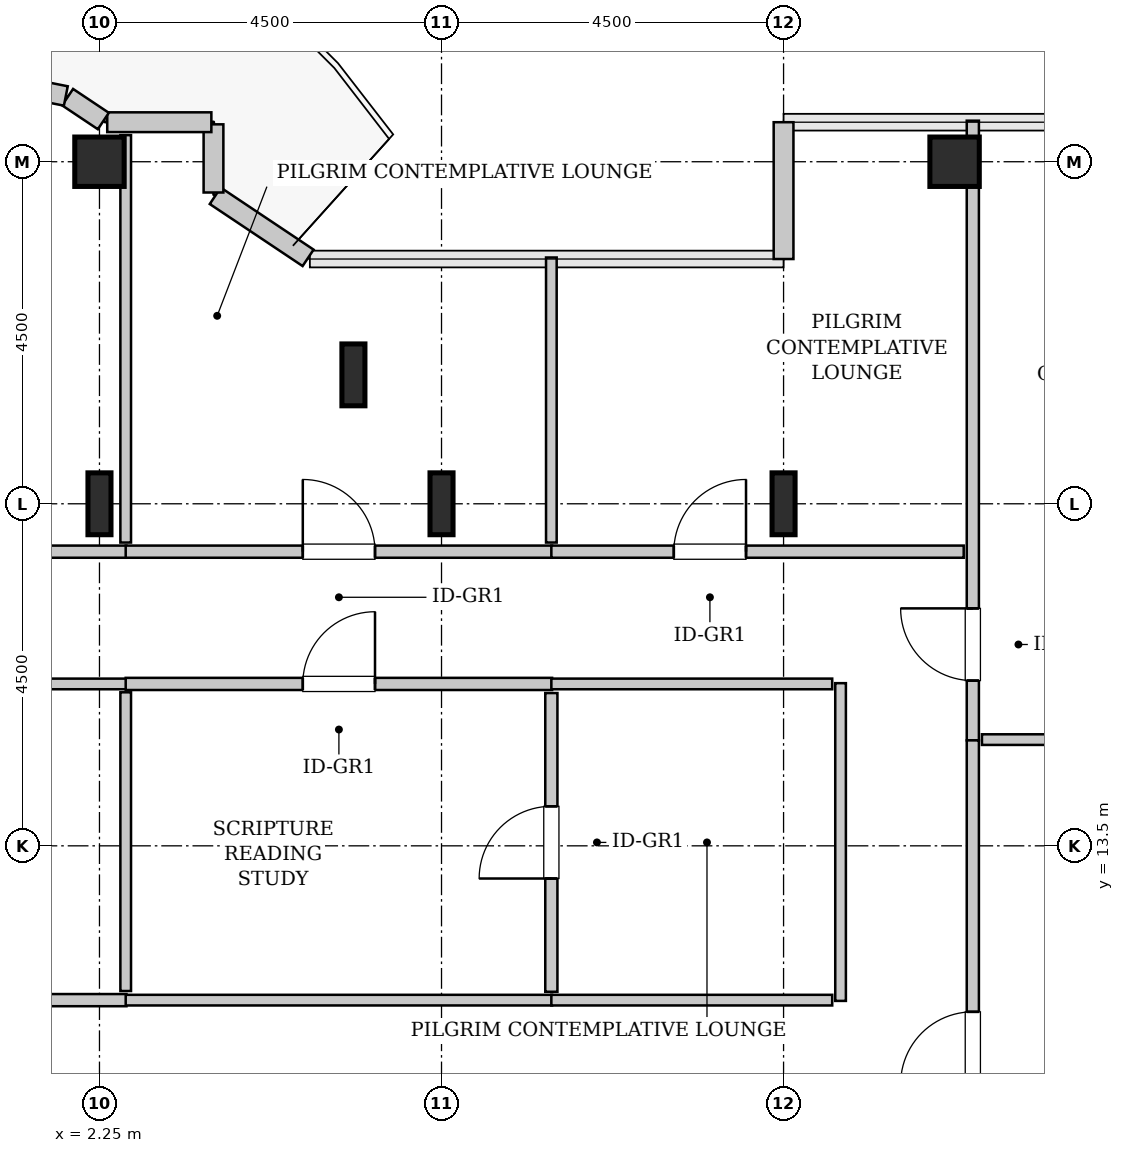
"""IFC4 building model, lengths in metres.
Left out: names, types, materials, properties, quantities, classifications, styles, units other than length and angle.
Written with IfcOpenShell. Run it as: python <this file> out.ifc"""

import sys

from ifc_helpers import new_model, si_unit, direction, frame, frame_2d, origin, origin_2d, place, context, subcontext, project, spatial, rectangle, hollow_rectangle, i_section, extrude, source, transform, mapped, element, fill, save


model = new_model("IFC4")
c1 = context("Model", 3, precision=1e-05, world=origin(), true_north=direction((0.0, 1.0)))
c2 = subcontext(c1, "Body", "Model", "MODEL_VIEW")
j1 = project(units=[si_unit("LENGTHUNIT", "METRE"), si_unit("PLANEANGLEUNIT", "RADIAN")], contexts=[c1])
p1 = place(None, origin())
s1 = spatial("IfcSite", under=j1, at=p1, CompositionType="ELEMENT")
p2 = place(p1, origin())
s2 = spatial("IfcBuilding", under=s1, at=p2, CompositionType="ELEMENT")
p3 = place(p2, frame((0.0, 0.0, 210.4)))
s3 = spatial("IfcBuildingStorey", under=s2, at=p3, CompositionType="ELEMENT", Elevation=210.4)
m1 = source(origin(), c2, "Body", "SweptSolid", [
    extrude(i_section(OverallWidth=0.303, OverallDepth=0.814, WebThickness=0.021, FlangeThickness=0.04, FilletRadius=0.03, at=origin_2d()), origin(), (0.0, 0.0, 1.0), 3.8),
])
p4 = place(p3, frame((2.25, 18.0, 0.0), z_axis=(0.0, 0.0, 1.0), x_axis=(1.0, 0.0, 0.0)))
e1 = element("IfcColumn", 1, at=p4, inside=s3, PredefinedType="COLUMN", context=c2, shape_type="MappedRepresentation", body=[
    mapped(m1, transform((0.0, 0.0, 0.0), x_axis=(1.0, 0.0, 0.0), y_axis=(0.0, 1.0, 0.0), z_axis=(0.0, 0.0, 1.0), scale=1.0)),
])
m2 = source(origin(), c2, "Body", "SweptSolid", [
    extrude(hollow_rectangle(XDim=0.65, YDim=0.65, WallThickness=0.032, InnerFilletRadius=0.032, OuterFilletRadius=0.064, at=origin_2d()), origin(), (0.0, 0.0, 1.0), 3.8),
])
p5 = place(p3, frame((2.25, 22.5, 0.0), z_axis=(0.0, 0.0, 1.0), x_axis=(1.0, 0.0, 0.0)))
e2 = element("IfcColumn", 2, at=p5, inside=s3, PredefinedType="COLUMN", context=c2, shape_type="MappedRepresentation", body=[
    mapped(m2, transform((0.0, 0.0, 0.0), x_axis=(1.0, 0.0, 0.0), y_axis=(0.0, 1.0, 0.0), z_axis=(0.0, 0.0, 1.0), scale=1.0)),
])
for number, where, z_axis, x_axis in (
    (3, (5.591, 19.696, 0.0), (0.0, 0.0, 1.0), (1.0, 0.0, 0.0)),
    (4, (6.75, 18.0, 0.0), (0.0, 0.0, 1.0), (1.0, 0.0, 0.0)),
    (5, (11.25, 18.0, 0.0), (0.0, 0.0, 1.0), (1.0, 0.0, 0.0)),
):
    element("IfcColumn", number, at=place(p3, frame(where, z_axis=z_axis, x_axis=x_axis)), inside=s3, PredefinedType="COLUMN", context=c2, shape_type="MappedRepresentation", body=[
        mapped(m1, transform((0.0, 0.0, 0.0), x_axis=(1.0, 0.0, 0.0), y_axis=(0.0, 1.0, 0.0), z_axis=(0.0, 0.0, 1.0), scale=1.0)),
    ])
p6 = place(p3, frame((13.5, 22.5, 0.0), z_axis=(0.0, 0.0, 1.0), x_axis=(1.0, 0.0, 0.0)))
e6 = element("IfcColumn", 6, at=p6, inside=s3, PredefinedType="COLUMN", context=c2, shape_type="MappedRepresentation", body=[
    mapped(m2, transform((0.0, 0.0, 0.0), x_axis=(1.0, 0.0, 0.0), y_axis=(0.0, 1.0, 0.0), z_axis=(0.0, 0.0, 1.0), scale=1.0)),
])
m3 = source(origin(), c2, "Body", "SweptSolid", [
    extrude(rectangle(XDim=1.8, YDim=0.26, at=frame_2d((0.9, 0.0))), origin(), (0.0, 0.0, 1.0), 3.55),
])
p7 = place(p3, frame((11.25, 23.02, 0.0), z_axis=(0.0, 0.0, 1.0), x_axis=(0.0, -1.0, 0.0)))
e7 = element("IfcWall", 7, at=p7, inside=s3, PredefinedType="SOLIDWALL", context=c2, shape_type="MappedRepresentation", body=[
    mapped(m3, transform((0.0, 0.0, 0.0), x_axis=(1.0, 0.0, 0.0), y_axis=(0.0, 1.0, 0.0), z_axis=(0.0, 0.0, 1.0), scale=1.0)),
])
m4 = source(origin(), c2, "Body", "SweptSolid", [
    extrude(rectangle(XDim=1.469, YDim=0.26, at=frame_2d((0.734, 0.0))), origin(), (0.0, 0.0, 1.0), 3.55),
])
p8 = place(p3, frame((4.995, 21.236, 0.0), z_axis=(0.0, 0.0, 1.0), x_axis=(-0.831461760506, 0.555581983884, 0.0)))
e8 = element("IfcWall", 8, at=p8, inside=s3, PredefinedType="SOLIDWALL", context=c2, shape_type="MappedRepresentation", body=[
    mapped(m4, transform((0.0, 0.0, 0.0), x_axis=(1.0, 0.0, 0.0), y_axis=(0.0, 1.0, 0.0), z_axis=(0.0, 0.0, 1.0), scale=1.0)),
])
m5 = source(origin(), c2, "Body", "SweptSolid", [
    extrude(rectangle(XDim=0.897, YDim=0.26, at=frame_2d((0.448, 0.0))), origin(), (0.0, 0.0, 1.0), 3.55),
])
p9 = place(p3, frame((3.75, 22.095, 0.0), z_axis=(0.0, 0.0, 1.0), x_axis=(0.0, 1.0, 0.0)))
e9 = element("IfcWall", 9, at=p9, inside=s3, PredefinedType="SOLIDWALL", context=c2, shape_type="MappedRepresentation", body=[
    mapped(m5, transform((0.0, 0.0, 0.0), x_axis=(1.0, 0.0, 0.0), y_axis=(0.0, 1.0, 0.0), z_axis=(0.0, 0.0, 1.0), scale=1.0)),
])
m6 = source(origin(), c2, "Body", "SweptSolid", [
    extrude(rectangle(XDim=1.37, YDim=0.26, at=frame_2d((0.685, 0.0))), origin(), (0.0, 0.0, 1.0), 3.55),
])
p10 = place(p3, frame((3.722, 23.02, 0.0), z_axis=(0.0, 0.0, 1.0), x_axis=(-1.0, 0.0, 0.0)))
e10 = element("IfcWall", 10, at=p10, inside=s3, PredefinedType="SOLIDWALL", context=c2, shape_type="MappedRepresentation", body=[
    mapped(m6, transform((0.0, 0.0, 0.0), x_axis=(1.0, 0.0, 0.0), y_axis=(0.0, 1.0, 0.0), z_axis=(0.0, 0.0, 1.0), scale=1.0)),
])
m7 = source(origin(), c2, "Body", "SweptSolid", [
    extrude(rectangle(XDim=0.565, YDim=0.26, at=frame_2d((0.283, 0.0))), origin(), (0.0, 0.0, 1.0), 3.55),
])
p11 = place(p3, frame((2.301, 23.036, 0.0), z_axis=(0.0, 0.0, 1.0), x_axis=(-0.831651492666, 0.555297933317, 0.0)))
e11 = element("IfcWall", 11, at=p11, inside=s3, PredefinedType="SOLIDWALL", context=c2, shape_type="MappedRepresentation", body=[
    mapped(m7, transform((0.0, 0.0, 0.0), x_axis=(1.0, 0.0, 0.0), y_axis=(0.0, 1.0, 0.0), z_axis=(0.0, 0.0, 1.0), scale=1.0)),
])
m8 = source(origin(), c2, "Body", "SweptSolid", [
    extrude(rectangle(XDim=4.137, YDim=0.26, at=frame_2d((2.068, 0.0))), origin(), (0.0, 0.0, 1.0), 3.55),
])
p12 = place(p3, frame((1.807, 23.365, 0.0), z_axis=(0.0, 0.0, 1.0), x_axis=(-0.980782170794, 0.195105954428, 0.0)))
e12 = element("IfcWall", 12, at=p12, inside=s3, PredefinedType="SOLIDWALL", context=c2, shape_type="MappedRepresentation", body=[
    mapped(m8, transform((0.0, 0.0, 0.0), x_axis=(1.0, 0.0, 0.0), y_axis=(0.0, 1.0, 0.0), z_axis=(0.0, 0.0, 1.0), scale=1.0)),
])
p13 = place(p12, frame((0.488, 0.0, 0.0)))
e13 = element("IfcOpeningElement", 13, at=p13, cuts=e12, PredefinedType="OPENING", context=c2, shape_type="SweptSolid", body=[
    extrude(rectangle(XDim=1.1, YDim=2.2, at=frame_2d((0.55, 1.1))), frame((0.0, 0.14, 0.0), z_axis=(0.0, -1.0, 0.0), x_axis=(1.0, 0.0, 0.0)), (0.0, 0.0, 1.0), 0.28),
])
m9 = source(origin(), c2, "Body", "SweptSolid", [
    extrude(rectangle(XDim=8.153, YDim=0.16, at=frame_2d((4.076, 0.0))), origin(), (0.0, 0.0, 1.0), 3.535),
])
p14 = place(p3, frame((13.74, 14.887, 0.0), z_axis=(0.0, 0.0, 1.0), x_axis=(0.0, 1.0, 0.0)))
e14 = element("IfcWall", 14, at=p14, inside=s3, PredefinedType="PARTITIONING", context=c2, shape_type="MappedRepresentation", body=[
    mapped(m9, transform((0.0, 0.0, 0.0), x_axis=(1.0, 0.0, 0.0), y_axis=(0.0, 1.0, 0.0), z_axis=(0.0, 0.0, 1.0), scale=1.0)),
])
p15 = place(p14, frame((0.786, 0.0, 0.0)))
e15 = element("IfcOpeningElement", 15, at=p15, cuts=e14, PredefinedType="OPENING", context=c2, shape_type="SweptSolid", body=[
    extrude(rectangle(XDim=0.95, YDim=2.1, at=frame_2d((0.475, 1.05))), frame((0.0, 0.09, 0.0), z_axis=(0.0, -1.0, 0.0), x_axis=(1.0, 0.0, 0.0)), (0.0, 0.0, 1.0), 0.18),
])
m10 = source(origin(), c2, "Body", "SweptSolid", [
    extrude(rectangle(XDim=11.43, YDim=0.14, at=frame_2d((5.715, 0.0))), origin(), (0.0, 0.0, 1.0), 3.535),
])
p16 = place(p3, frame((13.86, 14.897, 0.0), z_axis=(0.0, 0.0, 1.0), x_axis=(1.0, 0.0, 0.0)))
e16 = element("IfcWall", 16, at=p16, inside=s3, PredefinedType="PARTITIONING", context=c2, shape_type="MappedRepresentation", body=[
    mapped(m10, transform((0.0, 0.0, 0.0), x_axis=(1.0, 0.0, 0.0), y_axis=(0.0, 1.0, 0.0), z_axis=(0.0, 0.0, 1.0), scale=1.0)),
])
m11 = source(origin(), c2, "Body", "SweptSolid", [
    extrude(rectangle(XDim=8.093, YDim=0.16, at=frame_2d((4.046, 0.0))), origin(), (0.0, 0.0, 1.0), 3.535),
])
p17 = place(p3, frame((13.74, 6.795, 0.0), z_axis=(0.0, 0.0, 1.0), x_axis=(0.0, 1.0, 0.0)))
e17 = element("IfcWall", 17, at=p17, inside=s3, PredefinedType="PARTITIONING", context=c2, shape_type="MappedRepresentation", body=[
    mapped(m11, transform((0.0, 0.0, 0.0), x_axis=(1.0, 0.0, 0.0), y_axis=(0.0, 1.0, 0.0), z_axis=(0.0, 0.0, 1.0), scale=1.0)),
])
p18 = place(p17, frame((3.571, 0.0, 0.0)))
e18 = element("IfcOpeningElement", 18, at=p18, cuts=e17, PredefinedType="OPENING", context=c2, shape_type="SweptSolid", body=[
    extrude(rectangle(XDim=0.95, YDim=2.1, at=frame_2d((0.475, 1.05))), frame((0.0, 0.09, 0.0), z_axis=(0.0, -1.0, 0.0), x_axis=(1.0, 0.0, 0.0)), (0.0, 0.0, 1.0), 0.18),
])
m12 = source(origin(), c2, "Body", "SweptSolid", [
    extrude(rectangle(XDim=14.615, YDim=0.16, at=frame_2d((7.308, 0.0))), origin(), (0.0, 0.0, 1.0), 3.535),
])
p19 = place(p3, frame((-12.01, 11.47, 0.0), z_axis=(0.0, 0.0, 1.0), x_axis=(1.0, 0.0, 0.0)))
e19 = element("IfcWall", 19, at=p19, inside=s3, PredefinedType="PARTITIONING", context=c2, shape_type="MappedRepresentation", body=[
    mapped(m12, transform((0.0, 0.0, 0.0), x_axis=(1.0, 0.0, 0.0), y_axis=(0.0, 1.0, 0.0), z_axis=(0.0, 0.0, 1.0), scale=1.0)),
])
p20 = place(p19, frame((6.833, 0.0, 0.0)))
e20 = element("IfcOpeningElement", 20, at=p20, cuts=e19, PredefinedType="OPENING", context=c2, shape_type="SweptSolid", body=[
    extrude(rectangle(XDim=0.95, YDim=2.1, at=frame_2d((0.475, 1.05))), frame((0.0, 0.09, 0.0), z_axis=(0.0, -1.0, 0.0), x_axis=(1.0, 0.0, 0.0)), (0.0, 0.0, 1.0), 0.18),
])
m13 = source(origin(), c2, "Body", "SweptSolid", [
    extrude(rectangle(XDim=14.615, YDim=0.14, at=frame_2d((7.308, 0.0))), origin(), (0.0, 0.0, 1.0), 3.535),
])
p21 = place(p3, frame((-12.01, 15.63, 0.0), z_axis=(0.0, 0.0, 1.0), x_axis=(1.0, 0.0, 0.0)))
e21 = element("IfcWall", 21, at=p21, inside=s3, PredefinedType="PARTITIONING", context=c2, shape_type="MappedRepresentation", body=[
    mapped(m13, transform((0.0, 0.0, 0.0), x_axis=(1.0, 0.0, 0.0), y_axis=(0.0, 1.0, 0.0), z_axis=(0.0, 0.0, 1.0), scale=1.0)),
])
m14 = source(origin(), c2, "Body", "SweptSolid", [
    extrude(rectangle(XDim=3.93, YDim=0.14, at=frame_2d((1.965, 0.0))), origin(), (0.0, 0.0, 1.0), 3.535),
])
p22 = place(p3, frame((2.595, 11.59, 0.0), z_axis=(0.0, 0.0, 1.0), x_axis=(0.0, 1.0, 0.0)))
e22 = element("IfcWall", 22, at=p22, inside=s3, PredefinedType="PARTITIONING", context=c2, shape_type="MappedRepresentation", body=[
    mapped(m14, transform((0.0, 0.0, 0.0), x_axis=(1.0, 0.0, 0.0), y_axis=(0.0, 1.0, 0.0), z_axis=(0.0, 0.0, 1.0), scale=1.0)),
])
m15 = source(origin(), c2, "Body", "SweptSolid", [
    extrude(rectangle(XDim=10.045, YDim=0.16, at=frame_2d((5.022, 0.0))), origin(), (0.0, 0.0, 1.0), 3.535),
])
p23 = place(p3, frame((-7.44, 17.37, 0.0), z_axis=(0.0, 0.0, 1.0), x_axis=(1.0, 0.0, 0.0)))
e23 = element("IfcWall", 23, at=p23, inside=s3, PredefinedType="PARTITIONING", context=c2, shape_type="MappedRepresentation", body=[
    mapped(m15, transform((0.0, 0.0, 0.0), x_axis=(1.0, 0.0, 0.0), y_axis=(0.0, 1.0, 0.0), z_axis=(0.0, 0.0, 1.0), scale=1.0)),
])
p24 = place(p23, frame((3.865, 0.0, 0.0)))
e24 = element("IfcOpeningElement", 24, at=p24, cuts=e23, PredefinedType="OPENING", context=c2, shape_type="SweptSolid", body=[
    extrude(rectangle(XDim=0.95, YDim=2.1, at=frame_2d((0.475, 1.05))), frame((0.0, 0.09, 0.0), z_axis=(0.0, -1.0, 0.0), x_axis=(1.0, 0.0, 0.0)), (0.0, 0.0, 1.0), 0.18),
])
m16 = source(origin(), c2, "Body", "SweptSolid", [
    extrude(rectangle(XDim=5.36, YDim=0.14, at=frame_2d((2.68, 0.0))), origin(), (0.0, 0.0, 1.0), 2.925),
])
p25 = place(p3, frame((2.595, 17.49, 0.0), z_axis=(0.0, 0.0, 1.0), x_axis=(0.0, 1.0, 0.0)))
e25 = element("IfcWall", 25, at=p25, inside=s3, PredefinedType="PARTITIONING", context=c2, shape_type="MappedRepresentation", body=[
    mapped(m16, transform((0.0, 0.0, 0.0), x_axis=(1.0, 0.0, 0.0), y_axis=(0.0, 1.0, 0.0), z_axis=(0.0, 0.0, 1.0), scale=1.0)),
])
m17 = source(origin(), c2, "Body", "SweptSolid", [
    extrude(rectangle(XDim=5.61, YDim=0.16, at=frame_2d((2.805, 0.0))), origin(), (0.0, 0.0, 1.0), 3.535),
])
p26 = place(p3, frame((2.595, 17.37, 0.0), z_axis=(0.0, 0.0, 1.0), x_axis=(1.0, 0.0, 0.0)))
e26 = element("IfcWall", 26, at=p26, inside=s3, PredefinedType="PARTITIONING", context=c2, shape_type="MappedRepresentation", body=[
    mapped(m17, transform((0.0, 0.0, 0.0), x_axis=(1.0, 0.0, 0.0), y_axis=(0.0, 1.0, 0.0), z_axis=(0.0, 0.0, 1.0), scale=1.0)),
])
p27 = place(p26, frame((2.33, 0.0, 0.0)))
e27 = element("IfcOpeningElement", 27, at=p27, cuts=e26, PredefinedType="OPENING", context=c2, shape_type="SweptSolid", body=[
    extrude(rectangle(XDim=0.95, YDim=2.1, at=frame_2d((0.475, 1.05))), frame((0.0, 0.09, 0.0), z_axis=(0.0, -1.0, 0.0), x_axis=(1.0, 0.0, 0.0)), (0.0, 0.0, 1.0), 0.18),
])
m18 = source(origin(), c2, "Body", "SweptSolid", [
    extrude(rectangle(XDim=3.75, YDim=0.14, at=frame_2d((1.875, 0.0))), origin(), (0.0, 0.0, 1.0), 3.535),
])
p28 = place(p3, frame((8.195, 17.49, 0.0), z_axis=(0.0, 0.0, 1.0), x_axis=(0.0, 1.0, 0.0)))
e28 = element("IfcWall", 28, at=p28, inside=s3, PredefinedType="PARTITIONING", context=c2, shape_type="MappedRepresentation", body=[
    mapped(m18, transform((0.0, 0.0, 0.0), x_axis=(1.0, 0.0, 0.0), y_axis=(0.0, 1.0, 0.0), z_axis=(0.0, 0.0, 1.0), scale=1.0)),
])
p29 = place(p3, frame((2.595, 15.63, 0.0), z_axis=(0.0, 0.0, 1.0), x_axis=(1.0, 0.0, 0.0)))
e29 = element("IfcWall", 29, at=p29, inside=s3, PredefinedType="PARTITIONING", context=c2, shape_type="MappedRepresentation", body=[
    mapped(m17, transform((0.0, 0.0, 0.0), x_axis=(1.0, 0.0, 0.0), y_axis=(0.0, 1.0, 0.0), z_axis=(0.0, 0.0, 1.0), scale=1.0)),
])
p30 = place(p29, frame((2.33, 0.0, 0.0)))
e30 = element("IfcOpeningElement", 30, at=p30, cuts=e29, PredefinedType="OPENING", context=c2, shape_type="SweptSolid", body=[
    extrude(rectangle(XDim=0.95, YDim=2.1, at=frame_2d((0.475, 1.05))), frame((0.0, 0.09, 0.0), z_axis=(0.0, -1.0, 0.0), x_axis=(1.0, 0.0, 0.0)), (0.0, 0.0, 1.0), 0.18),
])
m19 = source(origin(), c2, "Body", "SweptSolid", [
    extrude(rectangle(XDim=5.61, YDim=0.14, at=frame_2d((2.805, 0.0))), origin(), (0.0, 0.0, 1.0), 3.535),
])
p31 = place(p3, frame((2.595, 11.47, 0.0), z_axis=(0.0, 0.0, 1.0), x_axis=(1.0, 0.0, 0.0)))
e31 = element("IfcWall", 31, at=p31, inside=s3, PredefinedType="PARTITIONING", context=c2, shape_type="MappedRepresentation", body=[
    mapped(m19, transform((0.0, 0.0, 0.0), x_axis=(1.0, 0.0, 0.0), y_axis=(0.0, 1.0, 0.0), z_axis=(0.0, 0.0, 1.0), scale=1.0)),
])
m20 = source(origin(), c2, "Body", "SweptSolid", [
    extrude(rectangle(XDim=3.93, YDim=0.16, at=frame_2d((1.965, 0.0))), origin(), (0.0, 0.0, 1.0), 3.535),
])
p32 = place(p3, frame((8.195, 11.58, 0.0), z_axis=(0.0, 0.0, 1.0), x_axis=(0.0, 1.0, 0.0)))
e32 = element("IfcWall", 32, at=p32, inside=s3, PredefinedType="PARTITIONING", context=c2, shape_type="MappedRepresentation", body=[
    mapped(m20, transform((0.0, 0.0, 0.0), x_axis=(1.0, 0.0, 0.0), y_axis=(0.0, 1.0, 0.0), z_axis=(0.0, 0.0, 1.0), scale=1.0)),
])
p33 = place(p32, frame((1.49, 0.0, 0.0)))
e33 = element("IfcOpeningElement", 33, at=p33, cuts=e32, PredefinedType="OPENING", context=c2, shape_type="SweptSolid", body=[
    extrude(rectangle(XDim=0.95, YDim=2.1, at=frame_2d((0.475, 1.05))), frame((0.0, 0.09, 0.0), z_axis=(0.0, -1.0, 0.0), x_axis=(1.0, 0.0, 0.0)), (0.0, 0.0, 1.0), 0.18),
])
m21 = source(origin(), c2, "Body", "SweptSolid", [
    extrude(rectangle(XDim=5.425, YDim=0.16, at=frame_2d((2.712, 0.0))), origin(), (0.0, 0.0, 1.0), 3.535),
])
p34 = place(p3, frame((8.195, 17.37, 0.0), z_axis=(0.0, 0.0, 1.0), x_axis=(1.0, 0.0, 0.0)))
e34 = element("IfcWall", 34, at=p34, inside=s3, PredefinedType="PARTITIONING", context=c2, shape_type="MappedRepresentation", body=[
    mapped(m21, transform((0.0, 0.0, 0.0), x_axis=(1.0, 0.0, 0.0), y_axis=(0.0, 1.0, 0.0), z_axis=(0.0, 0.0, 1.0), scale=1.0)),
])
p35 = place(p34, frame((1.611, 0.0, 0.0)))
e35 = element("IfcOpeningElement", 35, at=p35, cuts=e34, PredefinedType="OPENING", context=c2, shape_type="SweptSolid", body=[
    extrude(rectangle(XDim=0.95, YDim=2.1, at=frame_2d((0.475, 1.05))), frame((0.0, 0.09, 0.0), z_axis=(0.0, -1.0, 0.0), x_axis=(1.0, 0.0, 0.0)), (0.0, 0.0, 1.0), 0.18),
])
m22 = source(origin(), c2, "Body", "SweptSolid", [
    extrude(rectangle(XDim=4.18, YDim=0.14, at=frame_2d((2.09, 0.0))), origin(), (0.0, 0.0, 1.0), 3.535),
])
p36 = place(p3, frame((12.0, 11.46, 0.0), z_axis=(0.0, 0.0, 1.0), x_axis=(0.0, 1.0, 0.0)))
e36 = element("IfcWall", 36, at=p36, inside=s3, PredefinedType="PARTITIONING", context=c2, shape_type="MappedRepresentation", body=[
    mapped(m22, transform((0.0, 0.0, 0.0), x_axis=(1.0, 0.0, 0.0), y_axis=(0.0, 1.0, 0.0), z_axis=(0.0, 0.0, 1.0), scale=1.0)),
])
m23 = source(origin(), c2, "Body", "SweptSolid", [
    extrude(rectangle(XDim=3.695, YDim=0.14, at=frame_2d((1.847, 0.0))), origin(), (0.0, 0.0, 1.0), 3.535),
])
for number, where, z_axis, x_axis in (
    (37, (8.195, 15.63, 0.0), (0.0, 0.0, 1.0), (1.0, 0.0, 0.0)),
    (38, (8.195, 11.47, 0.0), (0.0, 0.0, 1.0), (1.0, 0.0, 0.0)),
):
    element("IfcWall", number, at=place(p3, frame(where, z_axis=z_axis, x_axis=x_axis)), inside=s3, PredefinedType="PARTITIONING", context=c2, shape_type="MappedRepresentation", body=[
        mapped(m23, transform((0.0, 0.0, 0.0), x_axis=(1.0, 0.0, 0.0), y_axis=(0.0, 1.0, 0.0), z_axis=(0.0, 0.0, 1.0), scale=1.0)),
    ])
m24 = source(origin(), c2, "Body", "SweptSolid", [
    extrude(rectangle(XDim=0.95, YDim=2.1, at=frame_2d((0.475, 1.05))), frame((0.0, 0.025, 0.0), z_axis=(0.0, -1.0, 0.0), x_axis=(1.0, 0.0, 0.0)), (0.0, 0.0, 1.0), 0.05),
])
p37 = place(p15, origin())
e39 = element("IfcDoor", 39, at=p37, inside=s3, OperationType="SINGLE_SWING_RIGHT", PredefinedType="DOOR", context=c2, shape_type="MappedRepresentation", body=[
    mapped(m24, transform((0.0, 0.0, 0.0), x_axis=(1.0, 0.0, 0.0), y_axis=(0.0, 1.0, 0.0), z_axis=(0.0, 0.0, 1.0), scale=1.0)),
])
fill(e15, e39)
p38 = place(p18, origin())
e40 = element("IfcDoor", 40, at=p38, inside=s3, OperationType="SINGLE_SWING_LEFT", PredefinedType="DOOR", context=c2, shape_type="MappedRepresentation", body=[
    mapped(m24, transform((0.0, 0.0, 0.0), x_axis=(1.0, 0.0, 0.0), y_axis=(0.0, 1.0, 0.0), z_axis=(0.0, 0.0, 1.0), scale=1.0)),
])
fill(e18, e40)
p39 = place(p27, origin())
e41 = element("IfcDoor", 41, at=p39, inside=s3, OperationType="SINGLE_SWING_LEFT", PredefinedType="DOOR", context=c2, shape_type="MappedRepresentation", body=[
    mapped(m24, transform((0.0, 0.0, 0.0), x_axis=(1.0, 0.0, 0.0), y_axis=(0.0, 1.0, 0.0), z_axis=(0.0, 0.0, 1.0), scale=1.0)),
])
fill(e27, e41)
p40 = place(p30, origin())
e42 = element("IfcDoor", 42, at=p40, inside=s3, OperationType="SINGLE_SWING_RIGHT", PredefinedType="DOOR", context=c2, shape_type="MappedRepresentation", body=[
    mapped(m24, transform((0.0, 0.0, 0.0), x_axis=(1.0, 0.0, 0.0), y_axis=(0.0, 1.0, 0.0), z_axis=(0.0, 0.0, 1.0), scale=1.0)),
])
fill(e30, e42)
p41 = place(p33, origin())
e43 = element("IfcDoor", 43, at=p41, inside=s3, OperationType="SINGLE_SWING_LEFT", PredefinedType="DOOR", context=c2, shape_type="MappedRepresentation", body=[
    mapped(m24, transform((0.0, 0.0, 0.0), x_axis=(1.0, 0.0, 0.0), y_axis=(0.0, 1.0, 0.0), z_axis=(0.0, 0.0, 1.0), scale=1.0)),
])
fill(e33, e43)
p42 = place(p35, origin())
e44 = element("IfcDoor", 44, at=p42, inside=s3, OperationType="SINGLE_SWING_RIGHT", PredefinedType="DOOR", context=c2, shape_type="MappedRepresentation", body=[
    mapped(m24, transform((0.0, 0.0, 0.0), x_axis=(1.0, 0.0, 0.0), y_axis=(0.0, 1.0, 0.0), z_axis=(0.0, 0.0, 1.0), scale=1.0)),
])
fill(e35, e44)
save(model, sys.argv[1])
